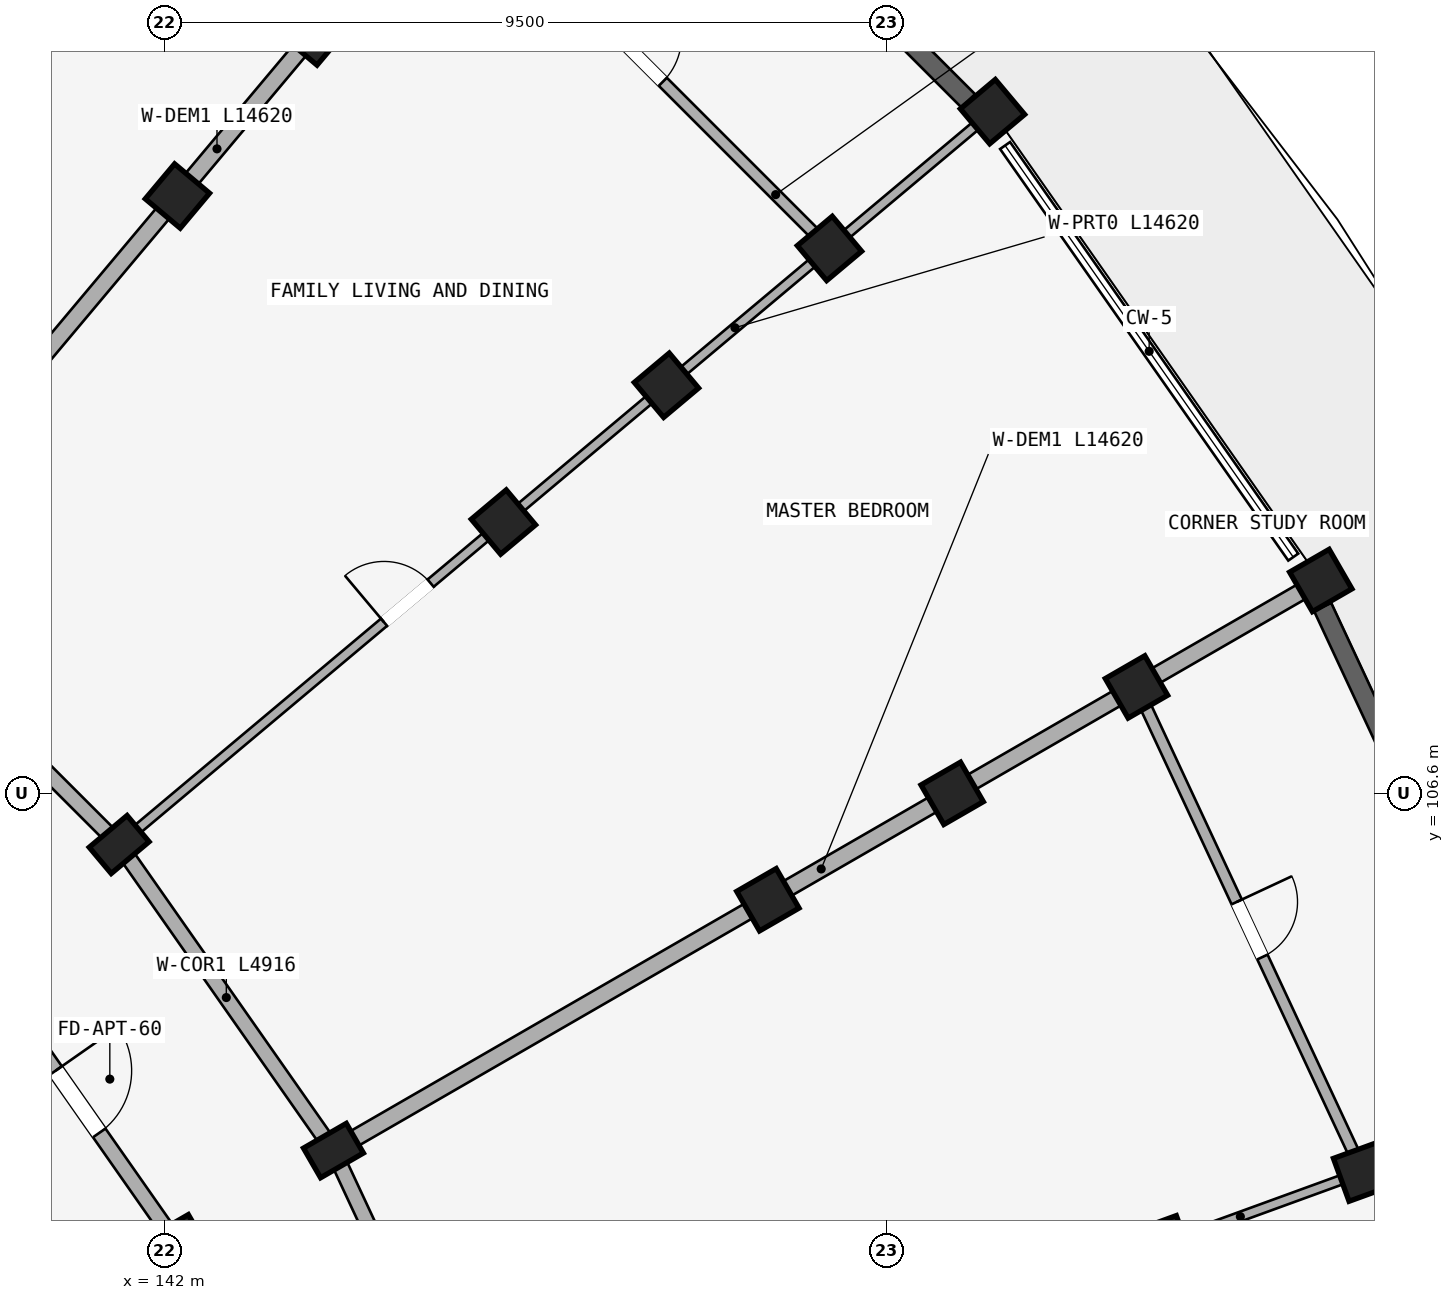
"""IFC4 building model, lengths in metres.
Left out: names, types, materials, properties, quantities, classifications, styles, units other than length and angle.
Written with IfcOpenShell. Run it as: python <this file> out.ifc"""

import sys

from ifc_helpers import new_model, si_unit, direction, frame, frame_2d, origin, origin_2d, place, context, subcontext, project, spatial, rectangle, extrude, element, fill, save


model = new_model("IFC4")
c1 = context("Model", 3, precision=1e-05, world=origin(), true_north=direction((0.0, 1.0)))
c2 = subcontext(c1, "Body", "Model", "MODEL_VIEW")
j1 = project(units=[si_unit("LENGTHUNIT", "METRE"), si_unit("PLANEANGLEUNIT", "RADIAN")], contexts=[c1])
p1 = place(None, origin())
s1 = spatial("IfcSite", under=j1, at=p1, CompositionType="ELEMENT")
p2 = place(p1, origin())
s2 = spatial("IfcBuilding", under=s1, at=p2, CompositionType="ELEMENT")
p3 = place(p2, frame((0.0, 0.0, 30.75)))
s3 = spatial("IfcBuildingStorey", under=s2, at=p3, CompositionType="ELEMENT", Elevation=30.75)
for number, where, z_axis, x_axis in (
    (1, (142.169, 114.458, 0.0), (0.0, 0.0, 1.0), (-0.766, 0.643, 0.0)),
    (2, (143.969, 116.603, 0.0), (0.0, 0.0, 1.0), (-0.766, 0.643, 0.0)),
):
    element("IfcColumn", number, at=place(p3, frame(where, z_axis=z_axis, x_axis=x_axis)), inside=s3, PredefinedType="COLUMN", context=c2, shape_type="SweptSolid", body=[
        extrude(rectangle(XDim=0.6, YDim=0.6, at=origin_2d()), origin(), (0.0, 0.0, 1.0), 2.93),
    ])
p4 = place(p3, frame((141.402, 105.927, 0.0), z_axis=(0.0, 0.0, 1.0), x_axis=(-0.642787609687, 0.766044443119, 0.0)))
e3 = element("IfcColumn", 3, at=p4, inside=s3, PredefinedType="COLUMN", context=c2, shape_type="SweptSolid", body=[
    extrude(rectangle(XDim=0.45, YDim=0.65, at=origin_2d()), origin(), (0.0, 0.0, 1.0), 2.93),
])
for number, where, z_axis, x_axis in (
    (4, (146.458, 110.169, 0.0), (0.0, 0.0, 1.0), (-0.643, 0.766, 0.0)),
    (5, (148.603, 111.969, 0.0), (0.0, 0.0, 1.0), (-0.643, 0.766, 0.0)),
    (6, (150.748, 113.769, 0.0), (0.0, 0.0, 1.0), (-0.643, 0.766, 0.0)),
):
    element("IfcColumn", number, at=place(p3, frame(where, z_axis=z_axis, x_axis=x_axis)), inside=s3, PredefinedType="COLUMN", context=c2, shape_type="SweptSolid", body=[
        extrude(rectangle(XDim=0.6, YDim=0.6, at=origin_2d()), origin(), (0.0, 0.0, 1.0), 2.93),
    ])
p5 = place(p3, frame((152.893, 115.568, 0.0), z_axis=(0.0, 0.0, 1.0), x_axis=(-0.642787609687, 0.766044443119, 0.0)))
e7 = element("IfcColumn", 7, at=p5, inside=s3, PredefinedType="COLUMN", context=c2, shape_type="SweptSolid", body=[
    extrude(rectangle(XDim=0.6, YDim=0.6, at=origin_2d()), origin(), (0.0, 0.0, 1.0), 2.97),
])
for number, where, z_axis, x_axis in (
    (8, (142.144, 100.7, 0.0), (0.0, 0.0, 1.0), (-0.5, 0.866, 0.0)),
    (9, (144.222, 101.9, 0.0), (0.0, 0.0, 1.0), (-0.5, 0.866, 0.0)),
):
    element("IfcColumn", number, at=place(p3, frame(where, z_axis=z_axis, x_axis=x_axis)), inside=s3, PredefinedType="COLUMN", context=c2, shape_type="SweptSolid", body=[
        extrude(rectangle(XDim=0.45, YDim=0.65, at=origin_2d()), origin(), (0.0, 0.0, 1.0), 2.93),
    ])
for number, where, z_axis, x_axis in (
    (10, (149.938, 105.2, 0.0), (0.0, 0.0, 1.0), (-0.5, 0.866, 0.0)),
    (11, (152.363, 106.6, 0.0), (0.0, 0.0, 1.0), (-0.5, 0.866, 0.0)),
    (12, (154.787, 108.0, 0.0), (0.0, 0.0, 1.0), (-0.5, 0.866, 0.0)),
):
    element("IfcColumn", number, at=place(p3, frame(where, z_axis=z_axis, x_axis=x_axis)), inside=s3, PredefinedType="COLUMN", context=c2, shape_type="SweptSolid", body=[
        extrude(rectangle(XDim=0.6, YDim=0.6, at=origin_2d()), origin(), (0.0, 0.0, 1.0), 2.93),
    ])
p6 = place(p3, frame((157.212, 109.4, 0.0), z_axis=(0.0, 0.0, 1.0), x_axis=(-0.5, 0.866025403784, 0.0)))
e13 = element("IfcColumn", 13, at=p6, inside=s3, PredefinedType="COLUMN", context=c2, shape_type="SweptSolid", body=[
    extrude(rectangle(XDim=0.6, YDim=0.6, at=origin_2d()), origin(), (0.0, 0.0, 1.0), 2.97),
])
for number, where, z_axis, x_axis in (
    (14, (155.132, 100.66, 0.0), (0.0, 0.0, 1.0), (-0.342, 0.94, 0.0)),
    (15, (157.764, 101.618, 0.0), (0.0, 0.0, 1.0), (-0.342, 0.94, 0.0)),
):
    element("IfcColumn", number, at=place(p3, frame(where, z_axis=z_axis, x_axis=x_axis)), inside=s3, PredefinedType="COLUMN", context=c2, shape_type="SweptSolid", body=[
        extrude(rectangle(XDim=0.6, YDim=0.6, at=origin_2d()), origin(), (0.0, 0.0, 1.0), 2.93),
    ])
p7 = place(p3, frame((137.927, 109.402, 0.0), z_axis=(0.0, 0.0, 1.0), x_axis=(0.707106781187, -0.707106781187, 0.0)))
e16 = element("IfcWall", 16, at=p7, inside=s3, PredefinedType="STANDARD", context=c2, shape_type="SweptSolid", body=[
    extrude(rectangle(XDim=4.916, YDim=0.2, at=frame_2d((2.458, 0.0))), origin(), (0.0, 0.0, 1.0), 2.372),
])
p8 = place(p7, frame((1.938, 0.0, 0.0)))
e17 = element("IfcOpeningElement", 17, at=p8, cuts=e16, PredefinedType="OPENING", context=c2, shape_type="SweptSolid", body=[
    extrude(rectangle(XDim=1.04, YDim=2.15, at=frame_2d((0.52, 1.075))), frame((0.0, 0.11, 0.0), z_axis=(0.0, -1.0, 0.0), x_axis=(1.0, 0.0, 0.0)), (0.0, 0.0, 1.0), 0.22),
])
p9 = place(p3, frame((139.564, 104.384, 0.0), z_axis=(0.0, 0.0, 1.0), x_axis=(0.573571637217, -0.819155404658, 0.0)))
e18 = element("IfcWall", 18, at=p9, inside=s3, PredefinedType="STANDARD", context=c2, shape_type="SweptSolid", body=[
    extrude(rectangle(XDim=4.497, YDim=0.2, at=frame_2d((2.249, 0.0))), origin(), (0.0, 0.0, 1.0), 2.372),
])
p10 = place(p9, frame((1.749, 0.0, 0.0)))
e19 = element("IfcOpeningElement", 19, at=p10, cuts=e18, PredefinedType="OPENING", context=c2, shape_type="SweptSolid", body=[
    extrude(rectangle(XDim=1.0, YDim=2.15, at=frame_2d((0.5, 1.075))), frame((0.0, 0.11, 0.0), z_axis=(0.0, -1.0, 0.0), x_axis=(1.0, 0.0, 0.0)), (0.0, 0.0, 1.0), 0.22),
])
p11 = place(p3, frame((141.402, 105.927, 0.0), z_axis=(0.0, 0.0, 1.0), x_axis=(0.573592335331, -0.819140911474, 0.0)))
e20 = element("IfcWall", 20, at=p11, inside=s3, PredefinedType="STANDARD", context=c2, shape_type="SweptSolid", body=[
    extrude(rectangle(XDim=4.916, YDim=0.2, at=frame_2d((2.458, 0.0))), origin(), (0.0, 0.0, 1.0), 2.372),
])
p12 = place(p3, frame((144.222, 101.9, 0.0), z_axis=(0.0, 0.0, 1.0), x_axis=(0.422629854778, -0.906302381024, 0.0)))
e21 = element("IfcWall", 21, at=p12, inside=s3, PredefinedType="STANDARD", context=c2, shape_type="SweptSolid", body=[
    extrude(rectangle(XDim=4.915, YDim=0.2, at=frame_2d((2.458, 0.0))), origin(), (0.0, 0.0, 1.0), 2.372),
])
p13 = place(p12, frame((1.918, 0.0, 0.0)))
e22 = element("IfcOpeningElement", 22, at=p13, cuts=e21, PredefinedType="OPENING", context=c2, shape_type="SweptSolid", body=[
    extrude(rectangle(XDim=1.08, YDim=2.15, at=frame_2d((0.54, 1.075))), frame((0.0, 0.11, 0.0), z_axis=(0.0, -1.0, 0.0), x_axis=(1.0, 0.0, 0.0)), (0.0, 0.0, 1.0), 0.22),
])
p14 = place(p3, frame((133.95, 112.309, 0.0), z_axis=(0.0, 0.0, 1.0), x_axis=(0.500007702989, 0.866020956416, 0.0)))
e23 = element("IfcWall", 23, at=p14, inside=s3, PredefinedType="PARTITIONING", context=c2, shape_type="SweptSolid", body=[
    extrude(rectangle(XDim=14.62, YDim=0.125, at=frame_2d((7.31, 0.0))), origin(), (0.0, 0.0, 1.0), 2.372),
])
p15 = place(p14, frame((4.449, 0.0, 0.0)))
e24 = element("IfcOpeningElement", 24, at=p15, cuts=e23, PredefinedType="OPENING", context=c2, shape_type="SweptSolid", body=[
    extrude(rectangle(XDim=0.8, YDim=2.1, at=frame_2d((0.4, 1.05))), frame((0.0, 0.073, 0.0), z_axis=(0.0, -1.0, 0.0), x_axis=(1.0, 0.0, 0.0)), (0.0, 0.0, 1.0), 0.145),
])
p16 = place(p3, frame((137.991, 109.479, 0.0), z_axis=(0.0, 0.0, 1.0), x_axis=(0.642779216656, 0.76605148563, 0.0)))
e25 = element("IfcWall", 25, at=p16, inside=s3, PredefinedType="STANDARD", context=c2, shape_type="SweptSolid", body=[
    extrude(rectangle(XDim=14.62, YDim=0.22, at=frame_2d((7.31, 0.0))), origin(), (0.0, 0.0, 1.0), 2.372),
])
p17 = place(p3, frame((141.479, 105.991, 0.0), z_axis=(0.0, 0.0, 1.0), x_axis=(0.76605148563, 0.642779216656, 0.0)))
e26 = element("IfcWall", 26, at=p17, inside=s3, PredefinedType="PARTITIONING", context=c2, shape_type="SweptSolid", body=[
    extrude(rectangle(XDim=14.62, YDim=0.125, at=frame_2d((7.31, 0.0))), origin(), (0.0, 0.0, 1.0), 2.372),
])
p18 = place(p17, frame((4.449, 0.0, 0.0)))
e27 = element("IfcOpeningElement", 27, at=p18, cuts=e26, PredefinedType="OPENING", context=c2, shape_type="SweptSolid", body=[
    extrude(rectangle(XDim=0.8, YDim=2.1, at=frame_2d((0.4, 1.05))), frame((0.0, 0.073, 0.0), z_axis=(0.0, -1.0, 0.0), x_axis=(1.0, 0.0, 0.0)), (0.0, 0.0, 1.0), 0.145),
])
p19 = place(p3, frame((144.309, 101.95, 0.0), z_axis=(0.0, 0.0, 1.0), x_axis=(0.866020956416, 0.500007702989, 0.0)))
e28 = element("IfcWall", 28, at=p19, inside=s3, PredefinedType="STANDARD", context=c2, shape_type="SweptSolid", body=[
    extrude(rectangle(XDim=14.62, YDim=0.22, at=frame_2d((7.31, 0.0))), origin(), (0.0, 0.0, 1.0), 2.372),
])
p20 = place(p3, frame((146.393, 97.479, 0.0), z_axis=(0.0, 0.0, 1.0), x_axis=(0.939694408106, 0.342015232663, 0.0)))
e29 = element("IfcWall", 29, at=p20, inside=s3, PredefinedType="PARTITIONING", context=c2, shape_type="SweptSolid", body=[
    extrude(rectangle(XDim=14.62, YDim=0.125, at=frame_2d((7.31, 0.0))), origin(), (0.0, 0.0, 1.0), 2.372),
])
p21 = place(p20, frame((4.449, 0.0, 0.0)))
e30 = element("IfcOpeningElement", 30, at=p21, cuts=e29, PredefinedType="OPENING", context=c2, shape_type="SweptSolid", body=[
    extrude(rectangle(XDim=0.8, YDim=2.1, at=frame_2d((0.4, 1.05))), frame((0.0, 0.073, 0.0), z_axis=(0.0, -1.0, 0.0), x_axis=(1.0, 0.0, 0.0)), (0.0, 0.0, 1.0), 0.145),
])
p22 = place(p3, frame((145.769, 118.748, 0.0), z_axis=(0.0, 0.0, 1.0), x_axis=(0.707106781187, -0.707106781187, 0.0)))
e31 = element("IfcWall", 31, at=p22, inside=s3, PredefinedType="PLUMBINGWALL", context=c2, shape_type="SweptSolid", body=[
    extrude(rectangle(XDim=7.042, YDim=0.15, at=frame_2d((3.521, 0.0))), origin(), (0.0, 0.0, 1.0), 2.372),
])
p23 = place(p22, frame((3.101, 0.0, 0.0)))
e32 = element("IfcOpeningElement", 32, at=p23, cuts=e31, PredefinedType="OPENING", context=c2, shape_type="SweptSolid", body=[
    extrude(rectangle(XDim=0.84, YDim=2.1, at=frame_2d((0.42, 1.05))), frame((0.0, 0.085, 0.0), z_axis=(0.0, -1.0, 0.0), x_axis=(1.0, 0.0, 0.0)), (0.0, 0.0, 1.0), 0.17),
])
p24 = place(p3, frame((154.787, 108.0, 0.0), z_axis=(0.0, 0.0, 1.0), x_axis=(0.422640621205, -0.906297360311, 0.0)))
e33 = element("IfcWall", 33, at=p24, inside=s3, PredefinedType="PLUMBINGWALL", context=c2, shape_type="SweptSolid", body=[
    extrude(rectangle(XDim=7.042, YDim=0.15, at=frame_2d((3.521, 0.0))), origin(), (0.0, 0.0, 1.0), 2.372),
])
p25 = place(p24, frame((3.121, 0.0, 0.0)))
e34 = element("IfcOpeningElement", 34, at=p25, cuts=e33, PredefinedType="OPENING", context=c2, shape_type="SweptSolid", body=[
    extrude(rectangle(XDim=0.8, YDim=2.1, at=frame_2d((0.4, 1.05))), frame((0.0, 0.085, 0.0), z_axis=(0.0, -1.0, 0.0), x_axis=(1.0, 0.0, 0.0)), (0.0, 0.0, 1.0), 0.17),
])
p26 = place(p3, frame((147.71, 120.574, 0.0), z_axis=(0.0, 0.0, 1.0), x_axis=(0.707106781187, -0.707106781187, 0.0)))
e35 = element("IfcWall", 35, at=p26, inside=s3, PredefinedType="STANDARD", context=c2, shape_type="SweptSolid", body=[
    extrude(rectangle(XDim=6.879, YDim=0.25, at=frame_2d((3.439, 0.0))), origin(), (0.0, 0.0, 1.0), 2.412),
])
p27 = place(p26, frame((4.479, 0.0, 0.462)))
e36 = element("IfcOpeningElement", 36, at=p27, cuts=e35, PredefinedType="OPENING", context=c2, shape_type="SweptSolid", body=[
    extrude(rectangle(XDim=1.2, YDim=1.5, at=frame_2d((0.6, 0.75))), frame((0.0, 0.135, 0.0), z_axis=(0.0, -1.0, 0.0), x_axis=(1.0, 0.0, 0.0)), (0.0, 0.0, 1.0), 0.27),
])
p28 = place(p26, frame((1.748, 0.0, 0.0)))
e37 = element("IfcOpeningElement", 37, at=p28, cuts=e35, PredefinedType="OPENING", context=c2, shape_type="SweptSolid", body=[
    extrude(rectangle(XDim=1.32, YDim=2.15, at=frame_2d((0.66, 1.075))), frame((0.0, 0.135, 0.0), z_axis=(0.0, -1.0, 0.0), x_axis=(1.0, 0.0, 0.0)), (0.0, 0.0, 1.0), 0.27),
])
p29 = place(p3, frame((157.237, 109.052, 0.0), z_axis=(0.0, 0.0, 1.0), x_axis=(0.422628979279, -0.906302789289, 0.0)))
e38 = element("IfcWall", 38, at=p29, inside=s3, PredefinedType="STANDARD", context=c2, shape_type="SweptSolid", body=[
    extrude(rectangle(XDim=6.879, YDim=0.25, at=frame_2d((3.439, 0.0))), origin(), (0.0, 0.0, 1.0), 2.412),
])
p30 = place(p29, frame((2.34, 0.0, 0.312)))
e39 = element("IfcOpeningElement", 39, at=p30, cuts=e38, PredefinedType="OPENING", context=c2, shape_type="SweptSolid", body=[
    extrude(rectangle(XDim=2.2, YDim=1.9, at=frame_2d((1.1, 0.95))), frame((0.0, 0.135, 0.0), z_axis=(0.0, -1.0, 0.0), x_axis=(1.0, 0.0, 0.0)), (0.0, 0.0, 1.0), 0.27),
])
p31 = place(p18, frame((0.8, 0.0, 0.0), z_axis=(0.0, 0.0, 1.0), x_axis=(-1.0, 0.0, 0.0)))
e40 = element("IfcDoor", 40, at=p31, inside=s3, OperationType="SINGLE_SWING_RIGHT", PredefinedType="DOOR", context=c2, shape_type="SweptSolid", body=[
    extrude(rectangle(XDim=0.8, YDim=2.1, at=frame_2d((0.4, 1.05))), frame((0.0, 0.025, 0.0), z_axis=(0.0, -1.0, 0.0), x_axis=(1.0, 0.0, 0.0)), (0.0, 0.0, 1.0), 0.05),
])
fill(e27, e40)
p32 = place(p23, frame((0.84, 0.0, 0.0), z_axis=(0.0, 0.0, 1.0), x_axis=(-1.0, 0.0, 0.0)))
e41 = element("IfcDoor", 41, at=p32, inside=s3, OperationType="SINGLE_SWING_RIGHT", PredefinedType="DOOR", context=c2, shape_type="SweptSolid", body=[
    extrude(rectangle(XDim=0.84, YDim=2.1, at=frame_2d((0.42, 1.05))), frame((0.0, 0.025, 0.0), z_axis=(0.0, -1.0, 0.0), x_axis=(1.0, 0.0, 0.0)), (0.0, 0.0, 1.0), 0.05),
])
fill(e32, e41)
p33 = place(p25, frame((0.8, 0.0, 0.0), z_axis=(0.0, 0.0, 1.0), x_axis=(-1.0, 0.0, 0.0)))
e42 = element("IfcDoor", 42, at=p33, inside=s3, OperationType="SINGLE_SWING_RIGHT", PredefinedType="DOOR", context=c2, shape_type="SweptSolid", body=[
    extrude(rectangle(XDim=0.8, YDim=2.1, at=frame_2d((0.4, 1.05))), frame((0.0, 0.025, 0.0), z_axis=(0.0, -1.0, 0.0), x_axis=(1.0, 0.0, 0.0)), (0.0, 0.0, 1.0), 0.05),
])
fill(e34, e42)
p34 = place(p10, frame((1.0, 0.0, 0.0), z_axis=(0.0, 0.0, 1.0), x_axis=(-1.0, 0.0, 0.0)))
e43 = element("IfcDoor", 43, at=p34, inside=s3, OperationType="SINGLE_SWING_RIGHT", PredefinedType="DOOR", context=c2, shape_type="SweptSolid", body=[
    extrude(rectangle(XDim=1.0, YDim=2.15, at=frame_2d((0.5, 1.075))), frame((0.0, 0.025, 0.0), z_axis=(0.0, -1.0, 0.0), x_axis=(1.0, 0.0, 0.0)), (0.0, 0.0, 1.0), 0.05),
])
fill(e19, e43)
save(model, sys.argv[1])
